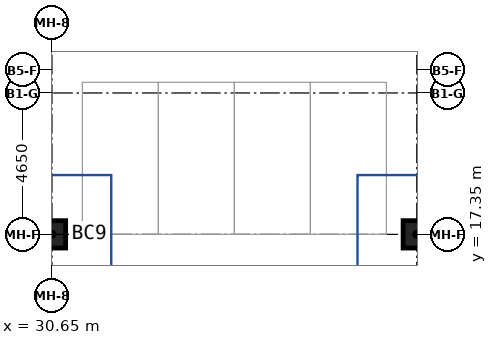
"""IFC4 building model, lengths in metres.
Left out: names, types, materials, properties, quantities, classifications, styles, units other than length and angle.
Written with IfcOpenShell. Run it as: python <this file> out.ifc"""

import sys

from ifc_helpers import new_model, si_unit, direction, frame, origin, origin_2d, place, context, subcontext, project, spatial, rectangle, extrude, source, transform, mapped, element, save


model = new_model("IFC4")
c1 = context("Model", 3, precision=1e-05, world=origin(), true_north=direction((0.0, 1.0)))
c2 = subcontext(c1, "Body", "Model", "MODEL_VIEW")
j1 = project(units=[si_unit("LENGTHUNIT", "METRE"), si_unit("PLANEANGLEUNIT", "RADIAN")], contexts=[c1])
p1 = place(None, origin())
s1 = spatial("IfcSite", under=j1, at=p1, CompositionType="ELEMENT")
p2 = place(p1, origin())
s2 = spatial("IfcBuilding", under=s1, at=p2, CompositionType="ELEMENT")
p3 = place(p2, frame((0.0, 0.0, -9.0)))
s3 = spatial("IfcBuildingStorey", under=s2, at=p3, CompositionType="ELEMENT", Elevation=-9.0)
m1 = source(origin(), c2, "Body", "SweptSolid", [
    extrude(rectangle(XDim=0.9, YDim=0.9, at=origin_2d()), origin(), (0.0, 0.0, 1.0), 4.5),
])
for number, where, z_axis, x_axis in (
    (1, (30.65, 17.35, 0.0), (0.0, 0.0, 1.0), (1.0, 0.0, 0.0)),
    (2, (42.65, 17.35, 0.0), (0.0, 0.0, 1.0), (1.0, 0.0, 0.0)),
):
    element("IfcColumn", number, at=place(p3, frame(where, z_axis=z_axis, x_axis=x_axis)), inside=s3, PredefinedType="COLUMN", context=c2, shape_type="MappedRepresentation", body=[
        mapped(m1, transform((0.0, 0.0, 0.0))),
    ])
save(model, sys.argv[1])
